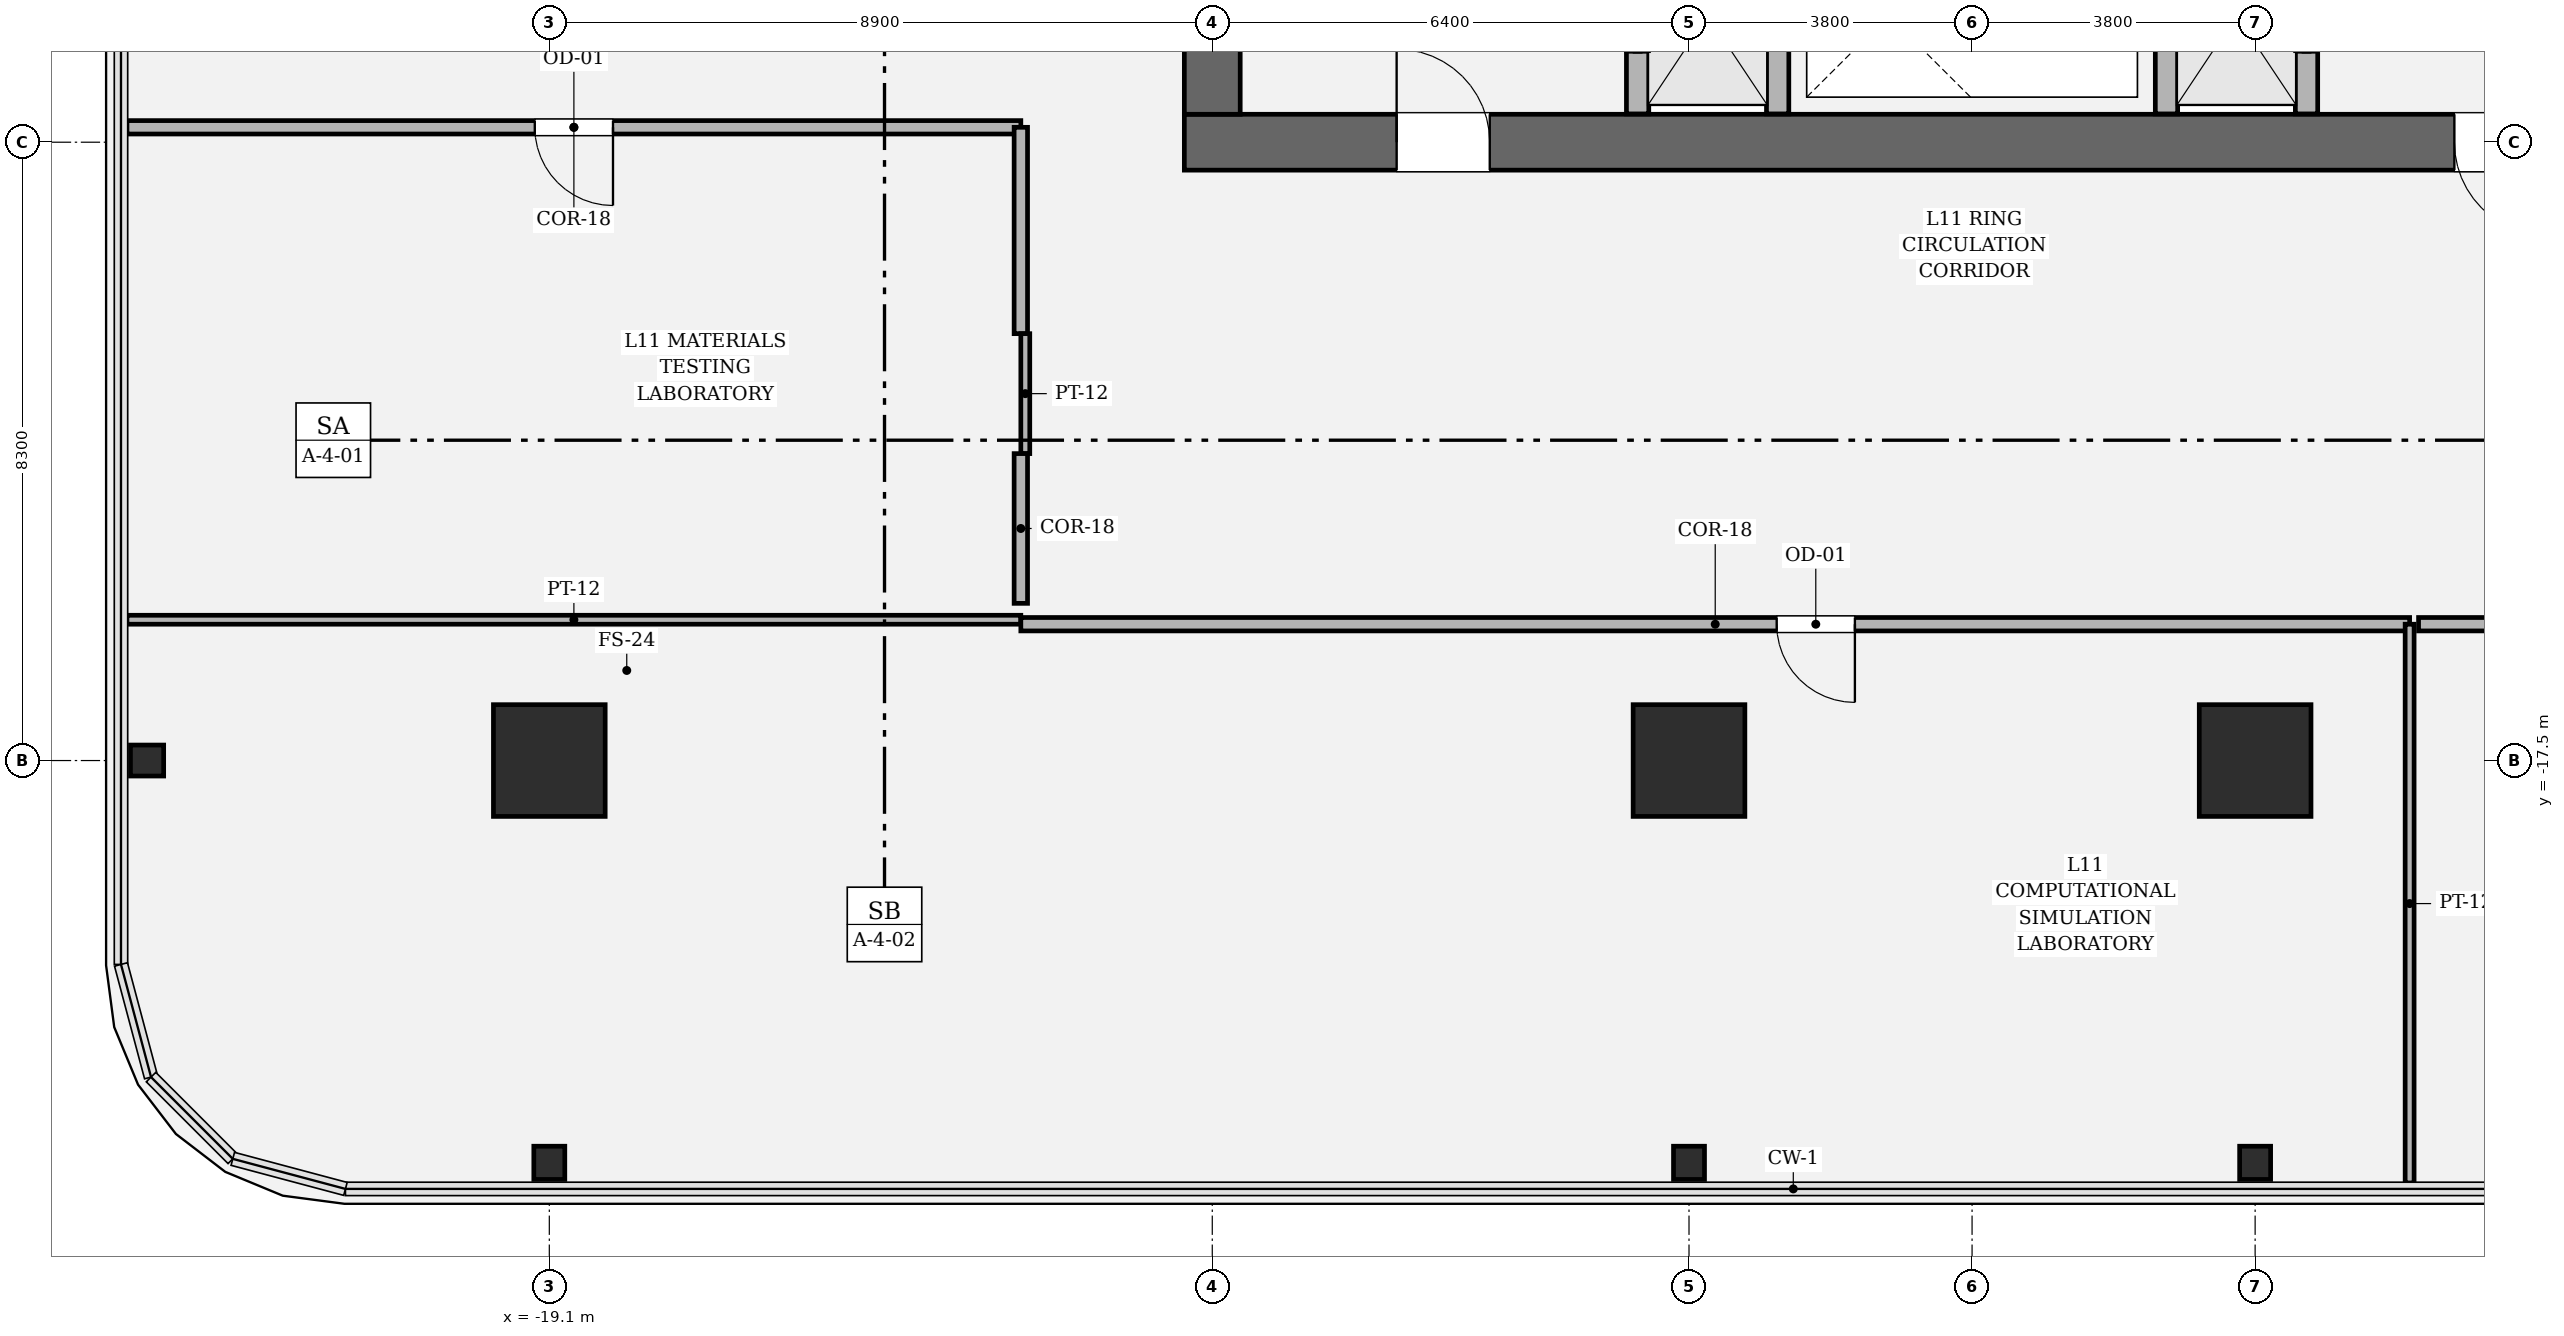
"""IFC4 building model, lengths in metres.
Left out: names, types, materials, properties, quantities, classifications, styles, units other than length and angle.
Written with IfcOpenShell. Run it as: python <this file> out.ifc"""

import sys

from ifc_helpers import new_model, si_unit, direction, frame, frame_2d, origin, origin_2d, place, context, subcontext, project, spatial, rectangle, hollow_rectangle, i_section, extrude, element, fill, save


model = new_model("IFC4")
c1 = context("Model", 3, precision=1e-05, world=origin(), true_north=direction((0.0, 1.0)))
c2 = subcontext(c1, "Body", "Model", "MODEL_VIEW")
j1 = project(units=[si_unit("LENGTHUNIT", "METRE"), si_unit("PLANEANGLEUNIT", "RADIAN")], contexts=[c1])
p1 = place(None, origin())
s1 = spatial("IfcSite", under=j1, at=p1, CompositionType="ELEMENT")
p2 = place(p1, origin())
s2 = spatial("IfcBuilding", under=s1, at=p2, CompositionType="ELEMENT")
p3 = place(p2, frame((0.0, 0.0, 52.5)))
s3 = spatial("IfcBuildingStorey", under=s2, at=p3, CompositionType="ELEMENT", Elevation=52.5)
p4 = place(p3, frame((10.575, -9.2, 0.0), z_axis=(0.0, 0.0, 1.0), x_axis=(-1.0, 0.0, 0.0)))
e1 = element("IfcWall", 1, at=p4, inside=s3, PredefinedType="SHEAR", context=c2, shape_type="SweptSolid", body=[
    extrude(rectangle(XDim=21.15, YDim=0.75, at=frame_2d((10.575, 0.0))), origin(), (0.0, 0.0, 1.0), 4.05),
])
p5 = place(p4, frame((2.85, 0.0, 0.0)))
e2 = element("IfcOpeningElement", 2, at=p5, cuts=e1, PredefinedType="OPENING", context=c2, shape_type="SweptSolid", body=[
    extrude(rectangle(XDim=1.25, YDim=2.25, at=frame_2d((0.625, 1.125))), frame((0.0, 0.385, 0.0), z_axis=(0.0, -1.0, 0.0), x_axis=(1.0, 0.0, 0.0)), (0.0, 0.0, 1.0), 0.77),
])
p6 = place(p4, frame((17.05, 0.0, 0.0)))
e3 = element("IfcOpeningElement", 3, at=p6, cuts=e1, PredefinedType="OPENING", context=c2, shape_type="SweptSolid", body=[
    extrude(rectangle(XDim=1.25, YDim=2.25, at=frame_2d((0.625, 1.125))), frame((0.0, 0.385, 0.0), z_axis=(0.0, -1.0, 0.0), x_axis=(1.0, 0.0, 0.0)), (0.0, 0.0, 1.0), 0.77),
])
p7 = place(p3, frame((-10.2, -8.825, 0.0), z_axis=(0.0, 0.0, 1.0), x_axis=(0.0, 1.0, 0.0)))
e4 = element("IfcWall", 4, at=p7, inside=s3, PredefinedType="SHEAR", context=c2, shape_type="SweptSolid", body=[
    extrude(rectangle(XDim=17.65, YDim=0.75, at=frame_2d((8.825, 0.0))), origin(), (0.0, 0.0, 1.0), 4.05),
])
p8 = place(p7, frame((12.615, 0.0, 0.0)))
e5 = element("IfcOpeningElement", 5, at=p8, cuts=e4, PredefinedType="OPENING", context=c2, shape_type="SweptSolid", body=[
    extrude(rectangle(XDim=1.18, YDim=2.2, at=frame_2d((0.59, 1.1))), frame((0.0, 0.385, 0.0), z_axis=(0.0, -1.0, 0.0), x_axis=(1.0, 0.0, 0.0)), (0.0, 0.0, 1.0), 0.77),
])
for number, where, z_axis, x_axis in (
    (6, (-19.1, -17.5, 0.0), (0.0, 0.0, 1.0), (1.0, 0.0, 0.0)),
    (7, (-3.8, -17.5, 0.0), (0.0, 0.0, 1.0), (1.0, 0.0, 0.0)),
    (8, (3.8, -17.5, 0.0), (0.0, 0.0, 1.0), (1.0, 0.0, 0.0)),
):
    element("IfcColumn", number, at=place(p3, frame(where, z_axis=z_axis, x_axis=x_axis)), inside=s3, PredefinedType="COLUMN", context=c2, shape_type="SweptSolid", body=[
        extrude(hollow_rectangle(XDim=1.5, YDim=1.5, WallThickness=0.045, at=origin_2d()), origin(), (0.0, 0.0, 1.0), 4.05),
    ])
for number, where, z_axis, x_axis in (
    (9, (-19.1, -22.9, 0.0), (0.0, 0.0, 1.0), (1.0, 0.0, 0.0)),
    (10, (-3.8, -22.9, 0.0), (0.0, 0.0, 1.0), (1.0, 0.0, 0.0)),
    (11, (3.8, -22.9, 0.0), (0.0, 0.0, 1.0), (1.0, 0.0, 0.0)),
    (12, (-24.5, -17.5, 0.0), (0.0, 0.0, 1.0), (0.0, 1.0, 0.0)),
):
    element("IfcColumn", number, at=place(p3, frame(where, z_axis=z_axis, x_axis=x_axis)), inside=s3, PredefinedType="COLUMN", context=c2, shape_type="SweptSolid", body=[
        extrude(i_section(OverallWidth=0.416, OverallDepth=0.446, WebThickness=0.039, FlangeThickness=0.062, FilletRadius=0.018, at=origin_2d()), origin(), (0.0, 0.0, 1.0), 4.048),
    ])
p9 = place(p3, frame((-4.49, -8.82, 0.0), z_axis=(0.0, 0.0, 1.0), x_axis=(0.0, 1.0, 0.0)))
e13 = element("IfcWall", 13, at=p9, inside=s3, PredefinedType="SOLIDWALL", context=c2, shape_type="SweptSolid", body=[
    extrude(rectangle(XDim=2.77, YDim=0.3, at=frame_2d((1.385, 0.0))), origin(), (0.0, 0.0, 1.0), 3.81),
])
p10 = place(p9, frame((0.825, 0.0, 0.0)))
e14 = element("IfcOpeningElement", 14, at=p10, cuts=e13, PredefinedType="OPENING", context=c2, shape_type="SweptSolid", body=[
    extrude(rectangle(XDim=1.12, YDim=2.25, at=frame_2d((0.56, 1.125))), frame((0.0, 0.16, 0.0), z_axis=(0.0, -1.0, 0.0), x_axis=(1.0, 0.0, 0.0)), (0.0, 0.0, 1.0), 0.32),
])
p11 = place(p3, frame((-2.61, -8.82, 0.0), z_axis=(0.0, 0.0, 1.0), x_axis=(0.0, 1.0, 0.0)))
e15 = element("IfcWall", 15, at=p11, inside=s3, PredefinedType="SOLIDWALL", context=c2, shape_type="SweptSolid", body=[
    extrude(rectangle(XDim=2.77, YDim=0.3, at=frame_2d((1.385, 0.0))), origin(), (0.0, 0.0, 1.0), 3.81),
])
p12 = place(p3, frame((4.49, -8.82, 0.0), z_axis=(0.0, 0.0, 1.0), x_axis=(0.0, 1.0, 0.0)))
e16 = element("IfcWall", 16, at=p12, inside=s3, PredefinedType="SOLIDWALL", context=c2, shape_type="SweptSolid", body=[
    extrude(rectangle(XDim=2.77, YDim=0.3, at=frame_2d((1.385, 0.0))), origin(), (0.0, 0.0, 1.0), 3.81),
])
p13 = place(p12, frame((0.825, 0.0, 0.0)))
e17 = element("IfcOpeningElement", 17, at=p13, cuts=e16, PredefinedType="OPENING", context=c2, shape_type="SweptSolid", body=[
    extrude(rectangle(XDim=1.12, YDim=2.25, at=frame_2d((0.56, 1.125))), frame((0.0, 0.16, 0.0), z_axis=(0.0, -1.0, 0.0), x_axis=(1.0, 0.0, 0.0)), (0.0, 0.0, 1.0), 0.32),
])
p14 = place(p3, frame((2.61, -8.82, 0.0), z_axis=(0.0, 0.0, 1.0), x_axis=(0.0, 1.0, 0.0)))
e18 = element("IfcWall", 18, at=p14, inside=s3, PredefinedType="SOLIDWALL", context=c2, shape_type="SweptSolid", body=[
    extrude(rectangle(XDim=2.77, YDim=0.3, at=frame_2d((1.385, 0.0))), origin(), (0.0, 0.0, 1.0), 3.81),
])
p15 = place(p3, frame((-24.77, -15.61, 0.0), z_axis=(0.0, 0.0, 1.0), x_axis=(1.0, 0.0, 0.0)))
e19 = element("IfcWall", 19, at=p15, inside=s3, PredefinedType="PARTITIONING", context=c2, shape_type="SweptSolid", body=[
    extrude(rectangle(XDim=12.0, YDim=0.12, at=frame_2d((6.0, 0.0))), origin(), (0.0, 0.0, 1.0), 2.524),
])
p16 = place(p3, frame((-12.77, -15.67, 0.0), z_axis=(0.0, 0.0, 1.0), x_axis=(1.0, 0.0, 0.0)))
e20 = element("IfcWall", 20, at=p16, inside=s3, PredefinedType="PARTITIONING", context=c2, shape_type="SweptSolid", body=[
    extrude(rectangle(XDim=18.644, YDim=0.18, at=frame_2d((9.322, 0.0))), origin(), (0.0, 0.0, 1.0), 3.104),
])
p17 = place(p16, frame((10.147, 0.0, 0.0)))
e21 = element("IfcOpeningElement", 21, at=p17, cuts=e20, PredefinedType="OPENING", context=c2, shape_type="SweptSolid", body=[
    extrude(rectangle(XDim=1.05, YDim=2.2, at=frame_2d((0.525, 1.1))), frame((0.0, 0.1, 0.0), z_axis=(0.0, -1.0, 0.0), x_axis=(1.0, 0.0, 0.0)), (0.0, 0.0, 1.0), 0.2),
])
p18 = place(p3, frame((5.874, -15.67, 0.0), z_axis=(0.0, 0.0, 1.0), x_axis=(0.0, -1.0, 0.0)))
e22 = element("IfcWall", 22, at=p18, inside=s3, PredefinedType="PARTITIONING", context=c2, shape_type="SweptSolid", body=[
    extrude(rectangle(XDim=7.5, YDim=0.12, at=frame_2d((3.75, 0.0))), origin(), (0.0, 0.0, 1.0), 2.524),
])
p19 = place(p3, frame((5.994, -15.67, 0.0), z_axis=(0.0, 0.0, 1.0), x_axis=(1.0, 0.0, 0.0)))
e23 = element("IfcWall", 23, at=p19, inside=s3, PredefinedType="PARTITIONING", context=c2, shape_type="SweptSolid", body=[
    extrude(rectangle(XDim=6.776, YDim=0.18, at=frame_2d((3.388, 0.0))), origin(), (0.0, 0.0, 1.0), 3.104),
])
p20 = place(p19, frame((2.863, 0.0, 0.0)))
e24 = element("IfcOpeningElement", 24, at=p20, cuts=e23, PredefinedType="OPENING", context=c2, shape_type="SweptSolid", body=[
    extrude(rectangle(XDim=1.05, YDim=2.2, at=frame_2d((0.525, 1.1))), frame((0.0, 0.1, 0.0), z_axis=(0.0, -1.0, 0.0), x_axis=(1.0, 0.0, 0.0)), (0.0, 0.0, 1.0), 0.2),
])
p21 = place(p3, frame((-24.77, -9.0, 0.0), z_axis=(0.0, 0.0, 1.0), x_axis=(1.0, 0.0, 0.0)))
e25 = element("IfcWall", 25, at=p21, inside=s3, PredefinedType="PARTITIONING", context=c2, shape_type="SweptSolid", body=[
    extrude(rectangle(XDim=12.0, YDim=0.18, at=frame_2d((6.0, 0.0))), origin(), (0.0, 0.0, 1.0), 2.524),
])
p22 = place(p21, frame((5.475, 0.0, 0.0)))
e26 = element("IfcOpeningElement", 26, at=p22, cuts=e25, PredefinedType="OPENING", context=c2, shape_type="SweptSolid", body=[
    extrude(rectangle(XDim=1.05, YDim=2.2, at=frame_2d((0.525, 1.1))), frame((0.0, 0.1, 0.0), z_axis=(0.0, -1.0, 0.0), x_axis=(1.0, 0.0, 0.0)), (0.0, 0.0, 1.0), 0.2),
])
p23 = place(p3, frame((-12.77, -9.0, 0.0), z_axis=(0.0, 0.0, 1.0), x_axis=(0.0, -1.0, 0.0)))
e27 = element("IfcWall", 27, at=p23, inside=s3, PredefinedType="PARTITIONING", context=c2, shape_type="SweptSolid", body=[
    extrude(rectangle(XDim=2.77, YDim=0.18, at=frame_2d((1.385, 0.0))), origin(), (0.0, 0.0, 1.0), 3.104),
])
p24 = place(p3, frame((-12.71, -11.77, 0.0), z_axis=(0.0, 0.0, 1.0), x_axis=(0.0, -1.0, 0.0)))
e28 = element("IfcWall", 28, at=p24, inside=s3, PredefinedType="PARTITIONING", context=c2, shape_type="SweptSolid", body=[
    extrude(rectangle(XDim=1.61, YDim=0.12, at=frame_2d((0.805, 0.0))), origin(), (0.0, 0.0, 1.0), 3.354),
])
p25 = place(p3, frame((-12.77, -13.38, 0.0), z_axis=(0.0, 0.0, 1.0), x_axis=(0.0, -1.0, 0.0)))
e29 = element("IfcWall", 29, at=p25, inside=s3, PredefinedType="PARTITIONING", context=c2, shape_type="SweptSolid", body=[
    extrude(rectangle(XDim=2.01, YDim=0.18, at=frame_2d((1.005, 0.0))), origin(), (0.0, 0.0, 1.0), 3.354),
])
p26 = place(p5, origin())
e30 = element("IfcDoor", 30, at=p26, inside=s3, OperationType="SINGLE_SWING_LEFT", PredefinedType="DOOR", context=c2, shape_type="SweptSolid", body=[
    extrude(rectangle(XDim=1.25, YDim=2.25, at=frame_2d((0.625, 1.125))), frame((0.0, 0.025, 0.0), z_axis=(0.0, -1.0, 0.0), x_axis=(1.0, 0.0, 0.0)), (0.0, 0.0, 1.0), 0.05),
])
fill(e2, e30)
p27 = place(p6, origin())
e31 = element("IfcDoor", 31, at=p27, inside=s3, OperationType="SINGLE_SWING_RIGHT", PredefinedType="DOOR", context=c2, shape_type="SweptSolid", body=[
    extrude(rectangle(XDim=1.25, YDim=2.25, at=frame_2d((0.625, 1.125))), frame((0.0, 0.025, 0.0), z_axis=(0.0, -1.0, 0.0), x_axis=(1.0, 0.0, 0.0)), (0.0, 0.0, 1.0), 0.05),
])
fill(e3, e31)
p28 = place(p17, origin())
e32 = element("IfcDoor", 32, at=p28, inside=s3, OperationType="SINGLE_SWING_RIGHT", PredefinedType="DOOR", context=c2, shape_type="SweptSolid", body=[
    extrude(rectangle(XDim=1.05, YDim=2.2, at=frame_2d((0.525, 1.1))), frame((0.0, 0.025, 0.0), z_axis=(0.0, -1.0, 0.0), x_axis=(1.0, 0.0, 0.0)), (0.0, 0.0, 1.0), 0.05),
])
fill(e21, e32)
p29 = place(p22, origin())
e33 = element("IfcDoor", 33, at=p29, inside=s3, OperationType="SINGLE_SWING_RIGHT", PredefinedType="DOOR", context=c2, shape_type="SweptSolid", body=[
    extrude(rectangle(XDim=1.05, YDim=2.2, at=frame_2d((0.525, 1.1))), frame((0.0, 0.025, 0.0), z_axis=(0.0, -1.0, 0.0), x_axis=(1.0, 0.0, 0.0)), (0.0, 0.0, 1.0), 0.05),
])
fill(e26, e33)
save(model, sys.argv[1])
